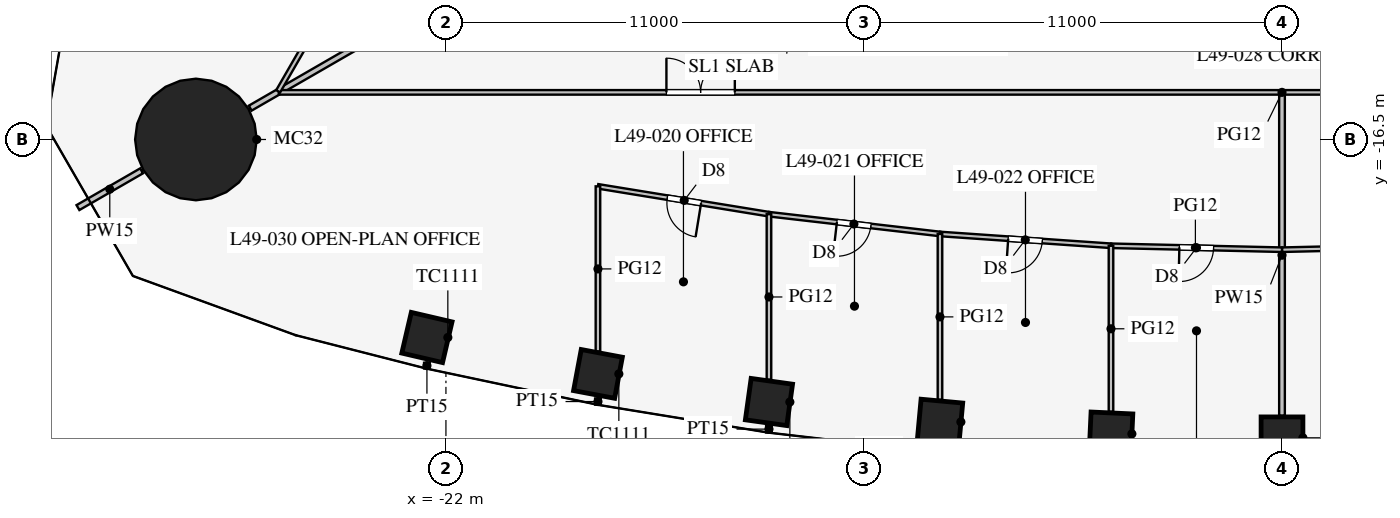
"""IFC4 building model, lengths in metres.
Left out: names, types, materials, properties, quantities, classifications, styles, units other than length and angle.
Written with IfcOpenShell. Run it as: python <this file> out.ifc"""

import sys

from ifc_helpers import new_model, si_unit, direction, frame, frame_2d, origin, origin_2d, place, context, subcontext, project, spatial, rectangle, circle, extrude, element, fill, save


model = new_model("IFC4")
c1 = context("Model", 3, precision=1e-05, world=origin(), true_north=direction((0.0, 1.0)))
c2 = subcontext(c1, "Body", "Model", "MODEL_VIEW")
j1 = project(units=[si_unit("LENGTHUNIT", "METRE"), si_unit("PLANEANGLEUNIT", "RADIAN")], contexts=[c1])
p1 = place(None, origin())
s1 = spatial("IfcSite", under=j1, at=p1, CompositionType="ELEMENT")
p2 = place(p1, origin())
s2 = spatial("IfcBuilding", under=s1, at=p2, CompositionType="ELEMENT")
p3 = place(p2, frame((0.0, 0.0, 214.9)))
s3 = spatial("IfcBuildingStorey", under=s2, at=p3, CompositionType="ELEMENT", Elevation=214.9)
for number, where, z_axis, x_axis in (
    (1, (-22.5, -21.71, 0.0), (0.0, 0.0, 1.0), (0.974, -0.227, 0.0)),
    (2, (-18.0, -22.669, 0.0), (0.0, 0.0, 1.0), (0.983, -0.184, 0.0)),
    (3, (-13.5, -23.408, 0.0), (0.0, 0.0, 1.0), (0.99, -0.138, 0.0)),
    (4, (-9.0, -23.933, 0.0), (0.0, 0.0, 1.0), (0.996, -0.092, 0.0)),
    (5, (-4.5, -24.246, 0.0), (0.0, 0.0, 1.0), (0.999, -0.046, 0.0)),
    (6, (0.0, -24.351, 0.0), (0.0, 0.0, 1.0), (1.0, 0.0, 0.0)),
):
    element("IfcColumn", number, at=place(p3, frame(where, z_axis=z_axis, x_axis=x_axis)), inside=s3, PredefinedType="COLUMN", context=c2, shape_type="SweptSolid", body=[
        extrude(rectangle(XDim=1.1, YDim=1.1, at=origin_2d()), origin(), (0.0, 0.0, 1.0), 4.2),
    ])
p4 = place(p3, frame((-28.579, -16.5, 0.0), z_axis=(0.0, 0.0, 1.0), x_axis=(1.0, 0.0, 0.0)))
e7 = element("IfcColumn", 7, at=p4, inside=s3, PredefinedType="COLUMN", context=c2, shape_type="SweptSolid", body=[
    extrude(circle(Radius=1.6, at=origin_2d()), origin(), (0.0, 0.0, 1.0), 4.2),
])
p5 = place(p3, frame((-14.203, -8.2, 0.0), z_axis=(0.0, 0.0, 1.0), x_axis=(-0.866021600284, -0.500006587798, 0.0)))
e8 = element("IfcWall", 8, at=p5, inside=s3, PredefinedType="PARTITIONING", context=c2, shape_type="SweptSolid", body=[
    extrude(rectangle(XDim=14.95, YDim=0.15, at=frame_2d((7.475, 0.0))), origin(), (0.0, 0.0, 1.0), 2.4),
])
p6 = place(p3, frame((-30.008, -17.325, 0.0), z_axis=(0.0, 0.0, 1.0), x_axis=(-0.866013246922, -0.500021055713, 0.0)))
e9 = element("IfcWall", 9, at=p6, inside=s3, PredefinedType="PARTITIONING", context=c2, shape_type="SweptSolid", body=[
    extrude(rectangle(XDim=1.935, YDim=0.15, at=frame_2d((0.967, 0.0))), origin(), (0.0, 0.0, 1.0), 2.4),
])
p7 = place(p3, frame((0.0, -15.32, 0.0), z_axis=(0.0, 0.0, 1.0), x_axis=(0.0, -1.0, 0.0)))
e10 = element("IfcWall", 10, at=p7, inside=s3, PredefinedType="PARTITIONING", context=c2, shape_type="SweptSolid", body=[
    extrude(rectangle(XDim=8.451, YDim=0.15, at=frame_2d((4.225, 0.0))), origin(), (0.0, 0.0, 1.0), 3.3),
])
p8 = place(p3, frame((-26.398, -15.26, 0.0), z_axis=(0.0, 0.0, 1.0), x_axis=(1.0, 0.0, 0.0)))
e11 = element("IfcWall", 11, at=p8, inside=s3, PredefinedType="PARTITIONING", context=c2, shape_type="SweptSolid", body=[
    extrude(rectangle(XDim=52.796, YDim=0.12, at=frame_2d((26.398, 0.0))), origin(), (0.0, 0.0, 1.0), 2.9),
])
p9 = place(p8, frame((10.2, 0.0, 0.15)))
e12 = element("IfcOpeningElement", 12, at=p9, cuts=e11, PredefinedType="OPENING", context=c2, shape_type="SweptSolid", body=[
    extrude(rectangle(XDim=1.8, YDim=2.1, at=frame_2d((0.9, 1.05))), frame((0.0, 0.07, 0.0), z_axis=(0.0, -1.0, 0.0), x_axis=(1.0, 0.0, 0.0)), (0.0, 0.0, 1.0), 0.14),
])
p10 = place(p8, frame((40.8, 0.0, 0.15)))
e13 = element("IfcOpeningElement", 13, at=p10, cuts=e11, PredefinedType="OPENING", context=c2, shape_type="SweptSolid", body=[
    extrude(rectangle(XDim=1.8, YDim=2.1, at=frame_2d((0.9, 1.05))), frame((0.0, 0.07, 0.0), z_axis=(0.0, -1.0, 0.0), x_axis=(1.0, 0.0, 0.0)), (0.0, 0.0, 1.0), 0.14),
])
p11 = place(p3, frame((-13.5, -24.033, 0.0), z_axis=(0.0, 0.0, 1.0), x_axis=(0.0, -1.0, 0.0)))
e14 = element("IfcWall", 14, at=p11, inside=s3, PredefinedType="PARTITIONING", context=c2, shape_type="SweptSolid", body=[
    extrude(rectangle(XDim=0.178, YDim=0.15, at=frame_2d((0.089, 0.0))), origin(), (0.0, 0.0, 1.0), 2.9),
])
p12 = place(p3, frame((-18.0, -23.315, 0.0), z_axis=(0.0, 0.0, 1.0), x_axis=(0.0, -1.0, 0.0)))
e15 = element("IfcWall", 15, at=p12, inside=s3, PredefinedType="PARTITIONING", context=c2, shape_type="SweptSolid", body=[
    extrude(rectangle(XDim=0.163, YDim=0.15, at=frame_2d((0.082, 0.0))), origin(), (0.0, 0.0, 1.0), 2.9),
])
p13 = place(p3, frame((-22.5, -22.375, 0.0), z_axis=(0.0, 0.0, 1.0), x_axis=(0.0, -1.0, 0.0)))
e16 = element("IfcWall", 16, at=p13, inside=s3, PredefinedType="PARTITIONING", context=c2, shape_type="SweptSolid", body=[
    extrude(rectangle(XDim=0.152, YDim=0.15, at=frame_2d((0.076, 0.0))), origin(), (0.0, 0.0, 1.0), 2.9),
])
p14 = place(p3, frame((0.0, -19.401, 0.0), z_axis=(0.0, 0.0, 1.0), x_axis=(0.99973552509, 0.022997388381, 0.0)))
e17 = element("IfcWall", 17, at=p14, inside=s3, PredefinedType="PARTITIONING", context=c2, shape_type="SweptSolid", body=[
    extrude(rectangle(XDim=4.501, YDim=0.12, at=frame_2d((2.25, 0.0))), origin(), (0.0, 0.0, 1.0), 2.9),
])
p15 = place(p14, frame((1.8, 0.0, 0.15)))
e18 = element("IfcOpeningElement", 18, at=p15, cuts=e17, PredefinedType="OPENING", context=c2, shape_type="SweptSolid", body=[
    extrude(rectangle(XDim=0.9, YDim=2.1, at=frame_2d((0.45, 1.05))), frame((0.0, 0.07, 0.0), z_axis=(0.0, -1.0, 0.0), x_axis=(1.0, 0.0, 0.0)), (0.0, 0.0, 1.0), 0.14),
])
p16 = place(p3, frame((-13.5, -18.466, 0.0), z_axis=(0.0, 0.0, 1.0), x_axis=(0.993382946625, -0.114849124309, 0.0)))
e19 = element("IfcWall", 19, at=p16, inside=s3, PredefinedType="PARTITIONING", context=c2, shape_type="SweptSolid", body=[
    extrude(rectangle(XDim=4.53, YDim=0.12, at=frame_2d((2.265, 0.0))), origin(), (0.0, 0.0, 1.0), 2.9),
])
p17 = place(p16, frame((1.8, 0.0, 0.15)))
e20 = element("IfcOpeningElement", 20, at=p17, cuts=e19, PredefinedType="OPENING", context=c2, shape_type="SweptSolid", body=[
    extrude(rectangle(XDim=0.9, YDim=2.1, at=frame_2d((0.45, 1.05))), frame((0.0, 0.07, 0.0), z_axis=(0.0, -1.0, 0.0), x_axis=(1.0, 0.0, 0.0)), (0.0, 0.0, 1.0), 0.14),
])
p18 = place(p3, frame((-18.0, -17.733, 0.0), z_axis=(0.0, 0.0, 1.0), x_axis=(0.986986525477, -0.160802980469, 0.0)))
e21 = element("IfcWall", 21, at=p18, inside=s3, PredefinedType="PARTITIONING", context=c2, shape_type="SweptSolid", body=[
    extrude(rectangle(XDim=4.559, YDim=0.12, at=frame_2d((2.28, 0.0))), origin(), (0.0, 0.0, 1.0), 2.9),
])
p19 = place(p18, frame((1.85, 0.0, 0.15)))
e22 = element("IfcOpeningElement", 22, at=p19, cuts=e21, PredefinedType="OPENING", context=c2, shape_type="SweptSolid", body=[
    extrude(rectangle(XDim=0.9, YDim=2.1, at=frame_2d((0.45, 1.05))), frame((0.0, 0.07, 0.0), z_axis=(0.0, -1.0, 0.0), x_axis=(1.0, 0.0, 0.0)), (0.0, 0.0, 1.0), 0.14),
])
p20 = place(p3, frame((-4.5, -19.297, 0.0), z_axis=(0.0, 0.0, 1.0), x_axis=(0.99973552509, -0.022997388381, 0.0)))
e23 = element("IfcWall", 23, at=p20, inside=s3, PredefinedType="PARTITIONING", context=c2, shape_type="SweptSolid", body=[
    extrude(rectangle(XDim=4.501, YDim=0.12, at=frame_2d((2.25, 0.0))), origin(), (0.0, 0.0, 1.0), 2.9),
])
p21 = place(p20, frame((1.8, 0.0, 0.15)))
e24 = element("IfcOpeningElement", 24, at=p21, cuts=e23, PredefinedType="OPENING", context=c2, shape_type="SweptSolid", body=[
    extrude(rectangle(XDim=0.9, YDim=2.1, at=frame_2d((0.45, 1.05))), frame((0.0, 0.07, 0.0), z_axis=(0.0, -1.0, 0.0), x_axis=(1.0, 0.0, 0.0)), (0.0, 0.0, 1.0), 0.14),
])
p22 = place(p3, frame((-9.0, -18.986, 0.0), z_axis=(0.0, 0.0, 1.0), x_axis=(0.997623533978, -0.068900540297, 0.0)))
e25 = element("IfcWall", 25, at=p22, inside=s3, PredefinedType="PARTITIONING", context=c2, shape_type="SweptSolid", body=[
    extrude(rectangle(XDim=4.511, YDim=0.12, at=frame_2d((2.255, 0.0))), origin(), (0.0, 0.0, 1.0), 2.9),
])
p23 = place(p22, frame((1.8, 0.0, 0.15)))
e26 = element("IfcOpeningElement", 26, at=p23, cuts=e25, PredefinedType="OPENING", context=c2, shape_type="SweptSolid", body=[
    extrude(rectangle(XDim=0.9, YDim=2.1, at=frame_2d((0.45, 1.05))), frame((0.0, 0.07, 0.0), z_axis=(0.0, -1.0, 0.0), x_axis=(1.0, 0.0, 0.0)), (0.0, 0.0, 1.0), 0.14),
])
p24 = place(p3, frame((-13.5, -18.466, 0.0), z_axis=(0.0, 0.0, 1.0), x_axis=(0.0, -1.0, 0.0)))
e27 = element("IfcWall", 27, at=p24, inside=s3, PredefinedType="PARTITIONING", context=c2, shape_type="SweptSolid", body=[
    extrude(rectangle(XDim=4.357, YDim=0.12, at=frame_2d((2.178, 0.0))), origin(), (0.0, 0.0, 1.0), 2.9),
])
p25 = place(p3, frame((-18.0, -17.733, 0.0), z_axis=(0.0, 0.0, 1.0), x_axis=(0.0, -1.0, 0.0)))
e28 = element("IfcWall", 28, at=p25, inside=s3, PredefinedType="PARTITIONING", context=c2, shape_type="SweptSolid", body=[
    extrude(rectangle(XDim=4.346, YDim=0.12, at=frame_2d((2.173, 0.0))), origin(), (0.0, 0.0, 1.0), 2.9),
])
p26 = place(p3, frame((-4.5, -19.297, 0.0), z_axis=(0.0, 0.0, 1.0), x_axis=(0.0, -1.0, 0.0)))
e29 = element("IfcWall", 29, at=p26, inside=s3, PredefinedType="PARTITIONING", context=c2, shape_type="SweptSolid", body=[
    extrude(rectangle(XDim=4.369, YDim=0.12, at=frame_2d((2.184, 0.0))), origin(), (0.0, 0.0, 1.0), 2.9),
])
p27 = place(p3, frame((-9.0, -18.986, 0.0), z_axis=(0.0, 0.0, 1.0), x_axis=(0.0, -1.0, 0.0)))
e30 = element("IfcWall", 30, at=p27, inside=s3, PredefinedType="PARTITIONING", context=c2, shape_type="SweptSolid", body=[
    extrude(rectangle(XDim=4.364, YDim=0.12, at=frame_2d((2.182, 0.0))), origin(), (0.0, 0.0, 1.0), 2.9),
])
p28 = place(p3, frame((-0.016, 30.491, 0.0), z_axis=(0.0, 0.0, 1.0), x_axis=(-0.50000091641, -0.866024874695, 0.0)))
e31 = element("IfcWall", 31, at=p28, inside=s3, PredefinedType="PARTITIONING", context=c2, shape_type="SweptSolid", body=[
    extrude(rectangle(XDim=52.796, YDim=0.12, at=frame_2d((26.398, 0.0))), origin(), (0.0, 0.0, 1.0), 2.9),
])
p29 = place(p28, frame((10.2, 0.0, 0.15)))
e32 = element("IfcOpeningElement", 32, at=p29, cuts=e31, PredefinedType="OPENING", context=c2, shape_type="SweptSolid", body=[
    extrude(rectangle(XDim=1.8, YDim=2.1, at=frame_2d((0.9, 1.05))), frame((0.0, 0.07, 0.0), z_axis=(0.0, -1.0, 0.0), x_axis=(1.0, 0.0, 0.0)), (0.0, 0.0, 1.0), 0.14),
])
p30 = place(p28, frame((40.8, 0.0, 0.15)))
e33 = element("IfcOpeningElement", 33, at=p30, cuts=e31, PredefinedType="OPENING", context=c2, shape_type="SweptSolid", body=[
    extrude(rectangle(XDim=1.8, YDim=2.1, at=frame_2d((0.9, 1.05))), frame((0.0, 0.07, 0.0), z_axis=(0.0, -1.0, 0.0), x_axis=(1.0, 0.0, 0.0)), (0.0, 0.0, 1.0), 0.14),
])
p31 = place(p19, frame((0.9, 0.0, 0.0), z_axis=(0.0, 0.0, 1.0), x_axis=(-1.0, 0.0, 0.0)))
e34 = element("IfcDoor", 34, at=p31, inside=s3, OperationType="SINGLE_SWING_LEFT", PredefinedType="DOOR", context=c2, shape_type="SweptSolid", body=[
    extrude(rectangle(XDim=0.9, YDim=2.1, at=frame_2d((0.45, 1.05))), frame((0.0, 0.025, 0.0), z_axis=(0.0, -1.0, 0.0), x_axis=(1.0, 0.0, 0.0)), (0.0, 0.0, 1.0), 0.05),
])
fill(e22, e34)
p32 = place(p17, frame((0.9, 0.0, 0.0), z_axis=(0.0, 0.0, 1.0), x_axis=(-1.0, 0.0, 0.0)))
e35 = element("IfcDoor", 35, at=p32, inside=s3, OperationType="SINGLE_SWING_RIGHT", PredefinedType="DOOR", context=c2, shape_type="SweptSolid", body=[
    extrude(rectangle(XDim=0.9, YDim=2.1, at=frame_2d((0.45, 1.05))), frame((0.0, 0.025, 0.0), z_axis=(0.0, -1.0, 0.0), x_axis=(1.0, 0.0, 0.0)), (0.0, 0.0, 1.0), 0.05),
])
fill(e20, e35)
p33 = place(p23, frame((0.9, 0.0, 0.0), z_axis=(0.0, 0.0, 1.0), x_axis=(-1.0, 0.0, 0.0)))
e36 = element("IfcDoor", 36, at=p33, inside=s3, OperationType="SINGLE_SWING_RIGHT", PredefinedType="DOOR", context=c2, shape_type="SweptSolid", body=[
    extrude(rectangle(XDim=0.9, YDim=2.1, at=frame_2d((0.45, 1.05))), frame((0.0, 0.025, 0.0), z_axis=(0.0, -1.0, 0.0), x_axis=(1.0, 0.0, 0.0)), (0.0, 0.0, 1.0), 0.05),
])
fill(e26, e36)
p34 = place(p21, frame((0.9, 0.0, 0.0), z_axis=(0.0, 0.0, 1.0), x_axis=(-1.0, 0.0, 0.0)))
e37 = element("IfcDoor", 37, at=p34, inside=s3, OperationType="SINGLE_SWING_RIGHT", PredefinedType="DOOR", context=c2, shape_type="SweptSolid", body=[
    extrude(rectangle(XDim=0.9, YDim=2.1, at=frame_2d((0.45, 1.05))), frame((0.0, 0.025, 0.0), z_axis=(0.0, -1.0, 0.0), x_axis=(1.0, 0.0, 0.0)), (0.0, 0.0, 1.0), 0.05),
])
fill(e24, e37)
p35 = place(p9, origin())
e38 = element("IfcDoor", 38, at=p35, inside=s3, OperationType="DOUBLE_DOOR_SINGLE_SWING", PredefinedType="DOOR", context=c2, shape_type="SweptSolid", body=[
    extrude(rectangle(XDim=1.8, YDim=2.1, at=frame_2d((0.9, 1.05))), frame((0.0, 0.025, 0.0), z_axis=(0.0, -1.0, 0.0), x_axis=(1.0, 0.0, 0.0)), (0.0, 0.0, 1.0), 0.05),
])
fill(e12, e38)
save(model, sys.argv[1])
